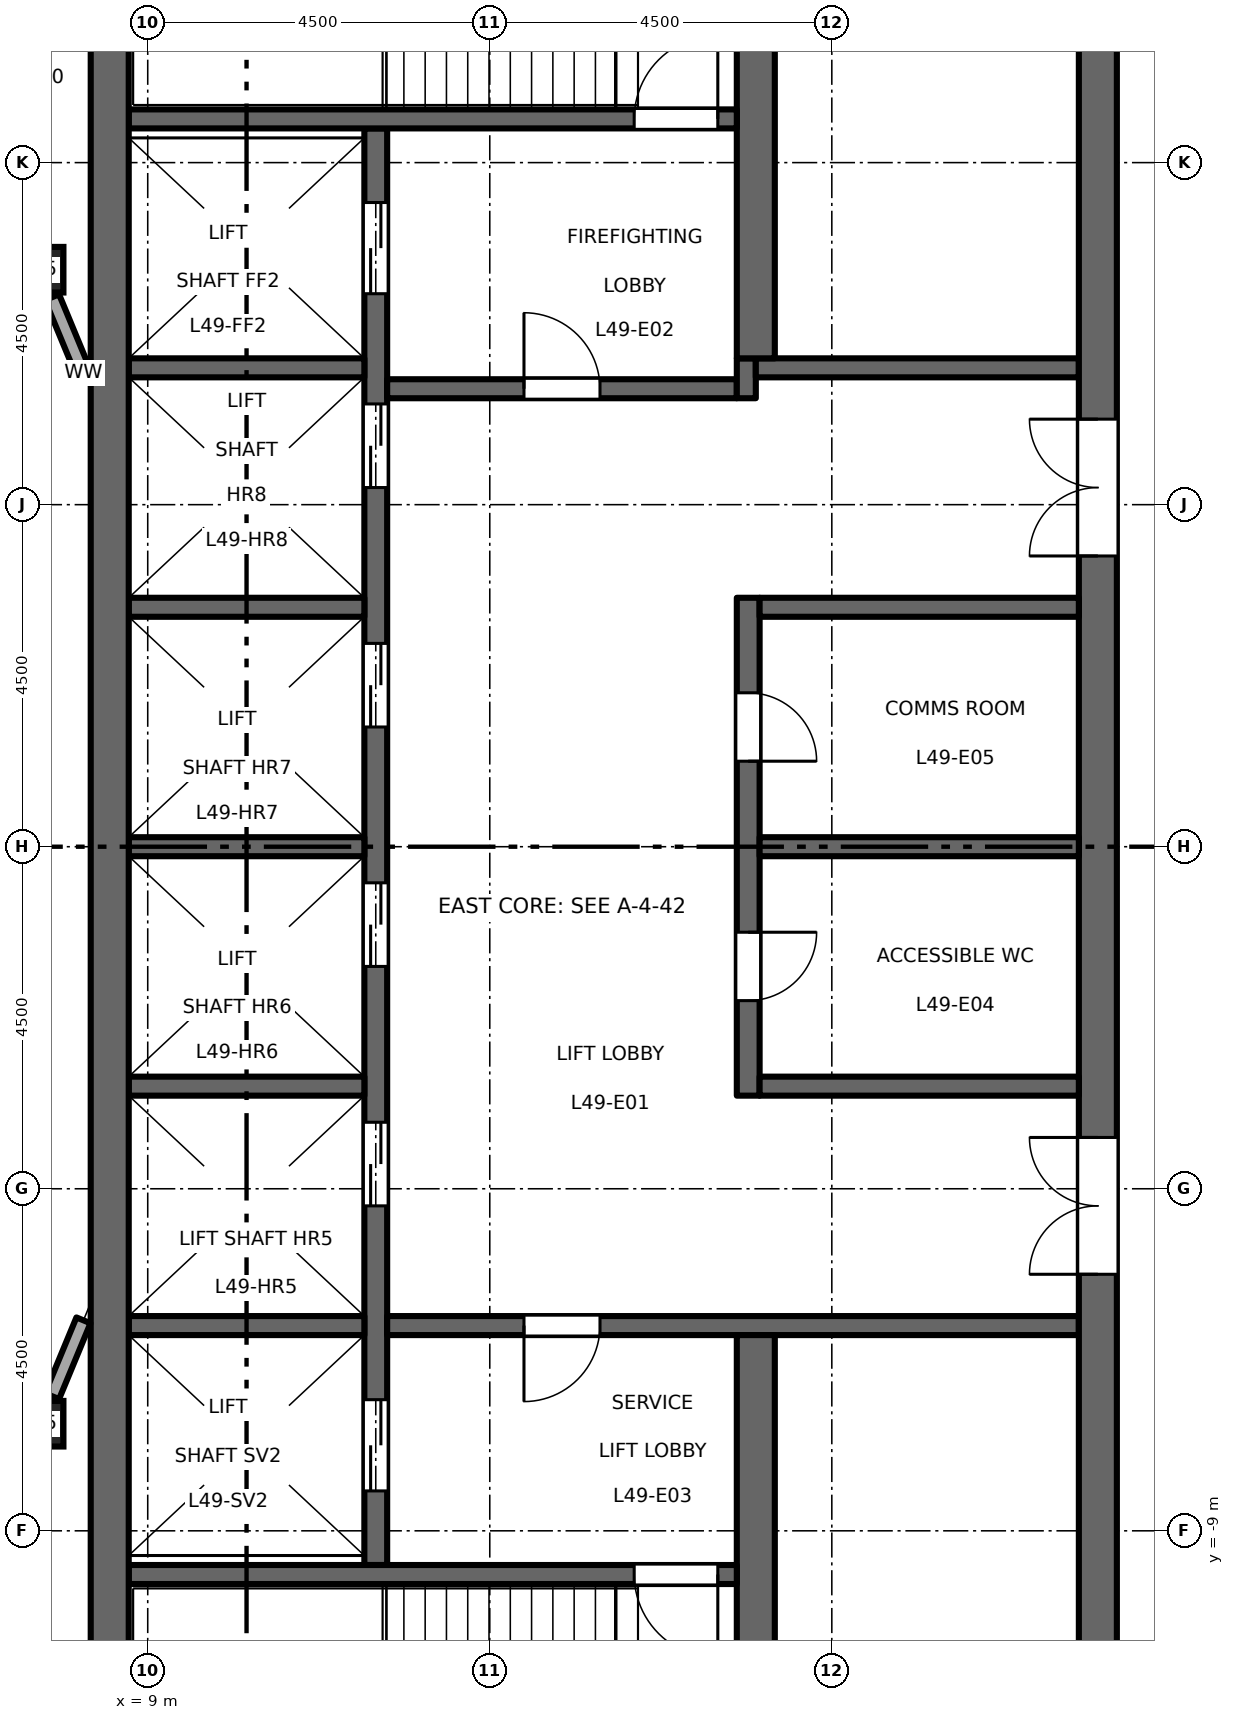
"""IFC4 building model, lengths in metres.
Left out: names, types, materials, properties, quantities, classifications, styles, units other than length and angle.
Written with IfcOpenShell. Run it as: python <this file> out.ifc"""

import sys

from ifc_helpers import new_model, si_unit, direction, frame, frame_2d, origin, origin_2d, place, context, subcontext, project, spatial, rectangle, hollow_rectangle, extrude, element, fill, save


model = new_model("IFC4")
c1 = context("Model", 3, precision=1e-05, world=origin(), true_north=direction((0.0, 1.0)))
c2 = subcontext(c1, "Body", "Model", "MODEL_VIEW")
j1 = project(units=[si_unit("LENGTHUNIT", "METRE"), si_unit("PLANEANGLEUNIT", "RADIAN")], contexts=[c1])
p1 = place(None, origin())
s1 = spatial("IfcSite", under=j1, at=p1, CompositionType="ELEMENT")
p2 = place(p1, origin())
s2 = spatial("IfcBuilding", under=s1, at=p2, CompositionType="ELEMENT")
p3 = place(p2, frame((0.0, 0.0, 228.7)))
s3 = spatial("IfcBuildingStorey", under=s2, at=p3, CompositionType="ELEMENT", Elevation=228.7)
for number, where, z_axis, x_axis in (
    (1, (7.591, -7.591, 0.0), (0.0, 0.0, 1.0), (1.0, 0.0, 0.0)),
    (2, (7.591, 7.591, 0.0), (0.0, 0.0, 1.0), (1.0, 0.0, 0.0)),
):
    element("IfcColumn", number, at=place(p3, frame(where, z_axis=z_axis, x_axis=x_axis)), inside=s3, PredefinedType="COLUMN", context=c2, shape_type="SweptSolid", body=[
        extrude(hollow_rectangle(XDim=0.6, YDim=0.6, WallThickness=0.032, at=origin_2d()), origin(), (0.0, 0.0, 1.0), 4.5),
    ])
p4 = place(p3, frame((12.0, -9.45, 0.0), z_axis=(0.0, 0.0, 1.0), x_axis=(0.0, 1.0, 0.0)))
e3 = element("IfcWall", 3, at=p4, inside=s3, PredefinedType="SHEAR", context=c2, shape_type="SweptSolid", body=[
    extrude(rectangle(XDim=18.9, YDim=0.3, at=frame_2d((9.45, 0.0))), origin(), (0.0, 0.0, 1.0), 4.35),
])
p5 = place(p4, frame((4.725, 0.0, 0.0)))
e4 = element("IfcOpeningElement", 4, at=p5, cuts=e3, PredefinedType="OPENING", context=c2, shape_type="SweptSolid", body=[
    extrude(rectangle(XDim=1.1, YDim=2.1, at=frame_2d((0.55, 1.05))), frame((0.0, 0.16, 0.0), z_axis=(0.0, -1.0, 0.0), x_axis=(1.0, 0.0, 0.0)), (0.0, 0.0, 1.0), 0.32),
])
p6 = place(p4, frame((7.875, 0.0, 0.0)))
e5 = element("IfcOpeningElement", 5, at=p6, cuts=e3, PredefinedType="OPENING", context=c2, shape_type="SweptSolid", body=[
    extrude(rectangle(XDim=1.1, YDim=2.1, at=frame_2d((0.55, 1.05))), frame((0.0, 0.16, 0.0), z_axis=(0.0, -1.0, 0.0), x_axis=(1.0, 0.0, 0.0)), (0.0, 0.0, 1.0), 0.32),
])
p7 = place(p4, frame((11.025, 0.0, 0.0)))
e6 = element("IfcOpeningElement", 6, at=p7, cuts=e3, PredefinedType="OPENING", context=c2, shape_type="SweptSolid", body=[
    extrude(rectangle(XDim=1.1, YDim=2.1, at=frame_2d((0.55, 1.05))), frame((0.0, 0.16, 0.0), z_axis=(0.0, -1.0, 0.0), x_axis=(1.0, 0.0, 0.0)), (0.0, 0.0, 1.0), 0.32),
])
p8 = place(p4, frame((14.175, 0.0, 0.0)))
e7 = element("IfcOpeningElement", 7, at=p8, cuts=e3, PredefinedType="OPENING", context=c2, shape_type="SweptSolid", body=[
    extrude(rectangle(XDim=1.1, YDim=2.1, at=frame_2d((0.55, 1.05))), frame((0.0, 0.16, 0.0), z_axis=(0.0, -1.0, 0.0), x_axis=(1.0, 0.0, 0.0)), (0.0, 0.0, 1.0), 0.32),
])
p9 = place(p4, frame((16.725, 0.0, 0.0)))
e8 = element("IfcOpeningElement", 8, at=p9, cuts=e3, PredefinedType="OPENING", context=c2, shape_type="SweptSolid", body=[
    extrude(rectangle(XDim=1.2, YDim=2.1, at=frame_2d((0.6, 1.05))), frame((0.0, 0.16, 0.0), z_axis=(0.0, -1.0, 0.0), x_axis=(1.0, 0.0, 0.0)), (0.0, 0.0, 1.0), 0.32),
])
p10 = place(p4, frame((0.975, 0.0, 0.0)))
e9 = element("IfcOpeningElement", 9, at=p10, cuts=e3, PredefinedType="OPENING", context=c2, shape_type="SweptSolid", body=[
    extrude(rectangle(XDim=1.2, YDim=2.1, at=frame_2d((0.6, 1.05))), frame((0.0, 0.16, 0.0), z_axis=(0.0, -1.0, 0.0), x_axis=(1.0, 0.0, 0.0)), (0.0, 0.0, 1.0), 0.32),
])
p11 = place(p3, frame((12.15, 6.025, 0.0), z_axis=(0.0, 0.0, 1.0), x_axis=(1.0, 0.0, 0.0)))
e10 = element("IfcWall", 10, at=p11, inside=s3, PredefinedType="SHEAR", context=c2, shape_type="SweptSolid", body=[
    extrude(rectangle(XDim=4.6, YDim=0.25, at=frame_2d((2.3, 0.0))), origin(), (0.0, 0.0, 1.0), 4.35),
])
p12 = place(p11, frame((1.8, 0.0, 0.0)))
e11 = element("IfcOpeningElement", 11, at=p12, cuts=e10, PredefinedType="OPENING", context=c2, shape_type="SweptSolid", body=[
    extrude(rectangle(XDim=1.0, YDim=2.1, at=frame_2d((0.5, 1.05))), frame((0.0, 0.135, 0.0), z_axis=(0.0, -1.0, 0.0), x_axis=(1.0, 0.0, 0.0)), (0.0, 0.0, 1.0), 0.27),
])
p13 = place(p3, frame((16.875, 5.9, 0.0), z_axis=(0.0, 0.0, 1.0), x_axis=(0.0, 1.0, 0.0)))
e12 = element("IfcWall", 12, at=p13, inside=s3, PredefinedType="SHEAR", context=c2, shape_type="SweptSolid", body=[
    extrude(rectangle(XDim=0.525, YDim=0.25, at=frame_2d((0.263, 0.0))), origin(), (0.0, 0.0, 1.0), 4.35),
])
p14 = place(p3, frame((17.0, 6.3, 0.0), z_axis=(0.0, 0.0, 1.0), x_axis=(1.0, 0.0, 0.0)))
e13 = element("IfcWall", 13, at=p14, inside=s3, PredefinedType="SHEAR", context=c2, shape_type="SweptSolid", body=[
    extrude(rectangle(XDim=4.25, YDim=0.25, at=frame_2d((2.125, 0.0))), origin(), (0.0, 0.0, 1.0), 4.35),
])
p15 = place(p3, frame((12.15, -6.3, 0.0), z_axis=(0.0, 0.0, 1.0), x_axis=(1.0, 0.0, 0.0)))
e14 = element("IfcWall", 14, at=p15, inside=s3, PredefinedType="SHEAR", context=c2, shape_type="SweptSolid", body=[
    extrude(rectangle(XDim=9.1, YDim=0.25, at=frame_2d((4.55, 0.0))), origin(), (0.0, 0.0, 1.0), 4.35),
])
p16 = place(p15, frame((1.8, 0.0, 0.0)))
e15 = element("IfcOpeningElement", 15, at=p16, cuts=e14, PredefinedType="OPENING", context=c2, shape_type="SweptSolid", body=[
    extrude(rectangle(XDim=1.0, YDim=2.1, at=frame_2d((0.5, 1.05))), frame((0.0, 0.135, 0.0), z_axis=(0.0, -1.0, 0.0), x_axis=(1.0, 0.0, 0.0)), (0.0, 0.0, 1.0), 0.27),
])
p17 = place(p3, frame((21.5, -13.0, 0.0), z_axis=(0.0, 0.0, 1.0), x_axis=(0.0, 1.0, 0.0)))
e16 = element("IfcWall", 16, at=p17, inside=s3, PredefinedType="SHEAR", context=c2, shape_type="SweptSolid", body=[
    extrude(rectangle(XDim=26.0, YDim=0.5, at=frame_2d((13.0, 0.0))), origin(), (0.0, 0.0, 1.0), 4.35),
])
p18 = place(p17, frame((16.825, 0.0, 0.0)))
e17 = element("IfcOpeningElement", 17, at=p18, cuts=e16, PredefinedType="OPENING", context=c2, shape_type="SweptSolid", body=[
    extrude(rectangle(XDim=1.8, YDim=2.1, at=frame_2d((0.9, 1.05))), frame((0.0, 0.26, 0.0), z_axis=(0.0, -1.0, 0.0), x_axis=(1.0, 0.0, 0.0)), (0.0, 0.0, 1.0), 0.52),
])
p19 = place(p17, frame((7.375, 0.0, 0.0)))
e18 = element("IfcOpeningElement", 18, at=p19, cuts=e16, PredefinedType="OPENING", context=c2, shape_type="SweptSolid", body=[
    extrude(rectangle(XDim=1.8, YDim=2.1, at=frame_2d((0.9, 1.05))), frame((0.0, 0.26, 0.0), z_axis=(0.0, -1.0, 0.0), x_axis=(1.0, 0.0, 0.0)), (0.0, 0.0, 1.0), 0.52),
])
p20 = place(p3, frame((16.9, -3.275, 0.0), z_axis=(0.0, 0.0, 1.0), x_axis=(0.0, 1.0, 0.0)))
e19 = element("IfcWall", 19, at=p20, inside=s3, PredefinedType="SHEAR", context=c2, shape_type="SweptSolid", body=[
    extrude(rectangle(XDim=6.55, YDim=0.3, at=frame_2d((3.275, 0.0))), origin(), (0.0, 0.0, 1.0), 4.35),
])
p21 = place(p20, frame((1.25, 0.0, 0.0)))
e20 = element("IfcOpeningElement", 20, at=p21, cuts=e19, PredefinedType="OPENING", context=c2, shape_type="SweptSolid", body=[
    extrude(rectangle(XDim=0.9, YDim=2.1, at=frame_2d((0.45, 1.05))), frame((0.0, 0.16, 0.0), z_axis=(0.0, -1.0, 0.0), x_axis=(1.0, 0.0, 0.0)), (0.0, 0.0, 1.0), 0.32),
])
p22 = place(p20, frame((4.4, 0.0, 0.0)))
e21 = element("IfcOpeningElement", 21, at=p22, cuts=e19, PredefinedType="OPENING", context=c2, shape_type="SweptSolid", body=[
    extrude(rectangle(XDim=0.9, YDim=2.1, at=frame_2d((0.45, 1.05))), frame((0.0, 0.16, 0.0), z_axis=(0.0, -1.0, 0.0), x_axis=(1.0, 0.0, 0.0)), (0.0, 0.0, 1.0), 0.32),
])
for number, where, z_axis, x_axis in (
    (22, (17.05, 0.0, 0.0), (0.0, 0.0, 1.0), (1.0, 0.0, 0.0)),
    (23, (17.05, 3.15, 0.0), (0.0, 0.0, 1.0), (1.0, 0.0, 0.0)),
    (24, (17.05, -3.15, 0.0), (0.0, 0.0, 1.0), (1.0, 0.0, 0.0)),
):
    element("IfcWall", number, at=place(p3, frame(where, z_axis=z_axis, x_axis=x_axis)), inside=s3, PredefinedType="SHEAR", context=c2, shape_type="SweptSolid", body=[
        extrude(rectangle(XDim=4.2, YDim=0.25, at=frame_2d((2.1, 0.0))), origin(), (0.0, 0.0, 1.0), 4.35),
    ])
for number, where, z_axis, x_axis in (
    (25, (17.0, 6.425, 0.0), (0.0, 0.0, 1.0), (0.0, 1.0, 0.0)),
    (26, (17.0, -13.0, 0.0), (0.0, 0.0, 1.0), (0.0, 1.0, 0.0)),
):
    element("IfcWall", number, at=place(p3, frame(where, z_axis=z_axis, x_axis=x_axis)), inside=s3, PredefinedType="SHEAR", context=c2, shape_type="SweptSolid", body=[
        extrude(rectangle(XDim=6.575, YDim=0.5, at=frame_2d((3.288, 0.0))), origin(), (0.0, 0.0, 1.0), 4.35),
    ])
for number, where, z_axis, x_axis in (
    (27, (8.75, 0.0, 0.0), (0.0, 0.0, 1.0), (1.0, 0.0, 0.0)),
    (28, (8.75, 3.15, 0.0), (0.0, 0.0, 1.0), (1.0, 0.0, 0.0)),
    (29, (8.75, 6.3, 0.0), (0.0, 0.0, 1.0), (1.0, 0.0, 0.0)),
    (30, (8.75, -3.15, 0.0), (0.0, 0.0, 1.0), (1.0, 0.0, 0.0)),
    (31, (8.75, -6.3, 0.0), (0.0, 0.0, 1.0), (1.0, 0.0, 0.0)),
):
    element("IfcWall", number, at=place(p3, frame(where, z_axis=z_axis, x_axis=x_axis)), inside=s3, PredefinedType="SHEAR", context=c2, shape_type="SweptSolid", body=[
        extrude(rectangle(XDim=3.1, YDim=0.25, at=frame_2d((1.55, 0.0))), origin(), (0.0, 0.0, 1.0), 4.35),
    ])
p23 = place(p3, frame((8.75, 9.575, 0.0), z_axis=(0.0, 0.0, 1.0), x_axis=(1.0, 0.0, 0.0)))
e32 = element("IfcWall", 32, at=p23, inside=s3, PredefinedType="SHEAR", context=c2, shape_type="SweptSolid", body=[
    extrude(rectangle(XDim=8.0, YDim=0.25, at=frame_2d((4.0, 0.0))), origin(), (0.0, 0.0, 1.0), 4.35),
])
p24 = place(p23, frame((6.65, 0.0, 0.0)))
e33 = element("IfcOpeningElement", 33, at=p24, cuts=e32, PredefinedType="OPENING", context=c2, shape_type="SweptSolid", body=[
    extrude(rectangle(XDim=1.1, YDim=2.1, at=frame_2d((0.55, 1.05))), frame((0.0, 0.135, 0.0), z_axis=(0.0, -1.0, 0.0), x_axis=(1.0, 0.0, 0.0)), (0.0, 0.0, 1.0), 0.27),
])
p25 = place(p3, frame((8.75, -9.575, 0.0), z_axis=(0.0, 0.0, 1.0), x_axis=(1.0, 0.0, 0.0)))
e34 = element("IfcWall", 34, at=p25, inside=s3, PredefinedType="SHEAR", context=c2, shape_type="SweptSolid", body=[
    extrude(rectangle(XDim=8.0, YDim=0.25, at=frame_2d((4.0, 0.0))), origin(), (0.0, 0.0, 1.0), 4.35),
])
p26 = place(p25, frame((6.65, 0.0, 0.0)))
e35 = element("IfcOpeningElement", 35, at=p26, cuts=e34, PredefinedType="OPENING", context=c2, shape_type="SweptSolid", body=[
    extrude(rectangle(XDim=1.1, YDim=2.1, at=frame_2d((0.55, 1.05))), frame((0.0, 0.135, 0.0), z_axis=(0.0, -1.0, 0.0), x_axis=(1.0, 0.0, 0.0)), (0.0, 0.0, 1.0), 0.27),
])
p27 = place(p3, frame((8.5, -13.0, 0.0), z_axis=(0.0, 0.0, 1.0), x_axis=(0.0, 1.0, 0.0)))
e36 = element("IfcWall", 36, at=p27, inside=s3, PredefinedType="SHEAR", context=c2, shape_type="SweptSolid", body=[
    extrude(rectangle(XDim=26.0, YDim=0.5, at=frame_2d((13.0, 0.0))), origin(), (0.0, 0.0, 1.0), 4.35),
])
for number, where, z_axis, x_axis in (
    (37, (7.741, -7.229, 0.0), (0.0, 0.0, 1.0), (0.383, 0.924, 0.0)),
    (38, (8.154, 6.231, 0.0), (0.0, 0.0, 1.0), (-0.383, 0.924, 0.0)),
):
    element("IfcWall", number, at=place(p3, frame(where, z_axis=z_axis, x_axis=x_axis)), inside=s3, PredefinedType="STANDARD", context=c2, shape_type="SweptSolid", body=[
        extrude(rectangle(XDim=1.08, YDim=0.2, at=frame_2d((0.54, 0.0))), origin(), (0.0, 0.0, 1.0), 3.918),
    ])
p28 = place(p12, origin())
e39 = element("IfcDoor", 39, at=p28, inside=s3, OperationType="SINGLE_SWING_RIGHT", PredefinedType="DOOR", context=c2, shape_type="SweptSolid", body=[
    extrude(rectangle(XDim=1.0, YDim=2.1, at=frame_2d((0.5, 1.05))), frame((0.0, 0.025, 0.0), z_axis=(0.0, -1.0, 0.0), x_axis=(1.0, 0.0, 0.0)), (0.0, 0.0, 1.0), 0.05),
])
fill(e11, e39)
p29 = place(p16, origin())
e40 = element("IfcDoor", 40, at=p29, inside=s3, OperationType="SINGLE_SWING_LEFT", PredefinedType="DOOR", context=c2, shape_type="SweptSolid", body=[
    extrude(rectangle(XDim=1.0, YDim=2.1, at=frame_2d((0.5, 1.05))), frame((0.0, 0.025, 0.0), z_axis=(0.0, -1.0, 0.0), x_axis=(1.0, 0.0, 0.0)), (0.0, 0.0, 1.0), 0.05),
])
fill(e15, e40)
p30 = place(p24, origin())
e41 = element("IfcDoor", 41, at=p30, inside=s3, OperationType="SINGLE_SWING_LEFT", PredefinedType="DOOR", context=c2, shape_type="SweptSolid", body=[
    extrude(rectangle(XDim=1.1, YDim=2.1, at=frame_2d((0.55, 1.05))), frame((0.0, 0.025, 0.0), z_axis=(0.0, -1.0, 0.0), x_axis=(1.0, 0.0, 0.0)), (0.0, 0.0, 1.0), 0.05),
])
fill(e33, e41)
p31 = place(p26, origin())
e42 = element("IfcDoor", 42, at=p31, inside=s3, OperationType="SINGLE_SWING_RIGHT", PredefinedType="DOOR", context=c2, shape_type="SweptSolid", body=[
    extrude(rectangle(XDim=1.1, YDim=2.1, at=frame_2d((0.55, 1.05))), frame((0.0, 0.025, 0.0), z_axis=(0.0, -1.0, 0.0), x_axis=(1.0, 0.0, 0.0)), (0.0, 0.0, 1.0), 0.05),
])
fill(e35, e42)
p32 = place(p18, origin())
e43 = element("IfcDoor", 43, at=p32, inside=s3, OperationType="DOUBLE_DOOR_DOUBLE_SWING", PredefinedType="DOOR", context=c2, shape_type="SweptSolid", body=[
    extrude(rectangle(XDim=1.8, YDim=2.1, at=frame_2d((0.9, 1.05))), frame((0.0, 0.025, 0.0), z_axis=(0.0, -1.0, 0.0), x_axis=(1.0, 0.0, 0.0)), (0.0, 0.0, 1.0), 0.05),
])
fill(e17, e43)
p33 = place(p19, origin())
e44 = element("IfcDoor", 44, at=p33, inside=s3, OperationType="DOUBLE_DOOR_DOUBLE_SWING", PredefinedType="DOOR", context=c2, shape_type="SweptSolid", body=[
    extrude(rectangle(XDim=1.8, YDim=2.1, at=frame_2d((0.9, 1.05))), frame((0.0, 0.025, 0.0), z_axis=(0.0, -1.0, 0.0), x_axis=(1.0, 0.0, 0.0)), (0.0, 0.0, 1.0), 0.05),
])
fill(e18, e44)
p34 = place(p5, origin())
e45 = element("IfcDoor", 45, at=p34, inside=s3, OperationType="DOUBLE_DOOR_SLIDING", PredefinedType="DOOR", context=c2, shape_type="SweptSolid", body=[
    extrude(rectangle(XDim=1.1, YDim=2.1, at=frame_2d((0.55, 1.05))), frame((0.0, 0.025, 0.0), z_axis=(0.0, -1.0, 0.0), x_axis=(1.0, 0.0, 0.0)), (0.0, 0.0, 1.0), 0.05),
])
fill(e4, e45)
p35 = place(p6, origin())
e46 = element("IfcDoor", 46, at=p35, inside=s3, OperationType="DOUBLE_DOOR_SLIDING", PredefinedType="DOOR", context=c2, shape_type="SweptSolid", body=[
    extrude(rectangle(XDim=1.1, YDim=2.1, at=frame_2d((0.55, 1.05))), frame((0.0, 0.025, 0.0), z_axis=(0.0, -1.0, 0.0), x_axis=(1.0, 0.0, 0.0)), (0.0, 0.0, 1.0), 0.05),
])
fill(e5, e46)
p36 = place(p7, origin())
e47 = element("IfcDoor", 47, at=p36, inside=s3, OperationType="DOUBLE_DOOR_SLIDING", PredefinedType="DOOR", context=c2, shape_type="SweptSolid", body=[
    extrude(rectangle(XDim=1.1, YDim=2.1, at=frame_2d((0.55, 1.05))), frame((0.0, 0.025, 0.0), z_axis=(0.0, -1.0, 0.0), x_axis=(1.0, 0.0, 0.0)), (0.0, 0.0, 1.0), 0.05),
])
fill(e6, e47)
p37 = place(p8, origin())
e48 = element("IfcDoor", 48, at=p37, inside=s3, OperationType="DOUBLE_DOOR_SLIDING", PredefinedType="DOOR", context=c2, shape_type="SweptSolid", body=[
    extrude(rectangle(XDim=1.1, YDim=2.1, at=frame_2d((0.55, 1.05))), frame((0.0, 0.025, 0.0), z_axis=(0.0, -1.0, 0.0), x_axis=(1.0, 0.0, 0.0)), (0.0, 0.0, 1.0), 0.05),
])
fill(e7, e48)
p38 = place(p9, origin())
e49 = element("IfcDoor", 49, at=p38, inside=s3, OperationType="DOUBLE_DOOR_SLIDING", PredefinedType="DOOR", context=c2, shape_type="SweptSolid", body=[
    extrude(rectangle(XDim=1.2, YDim=2.1, at=frame_2d((0.6, 1.05))), frame((0.0, 0.025, 0.0), z_axis=(0.0, -1.0, 0.0), x_axis=(1.0, 0.0, 0.0)), (0.0, 0.0, 1.0), 0.05),
])
fill(e8, e49)
p39 = place(p10, origin())
e50 = element("IfcDoor", 50, at=p39, inside=s3, OperationType="DOUBLE_DOOR_SLIDING", PredefinedType="DOOR", context=c2, shape_type="SweptSolid", body=[
    extrude(rectangle(XDim=1.2, YDim=2.1, at=frame_2d((0.6, 1.05))), frame((0.0, 0.025, 0.0), z_axis=(0.0, -1.0, 0.0), x_axis=(1.0, 0.0, 0.0)), (0.0, 0.0, 1.0), 0.05),
])
fill(e9, e50)
p40 = place(p21, origin())
e51 = element("IfcDoor", 51, at=p40, inside=s3, OperationType="SINGLE_SWING_RIGHT", PredefinedType="DOOR", context=c2, shape_type="SweptSolid", body=[
    extrude(rectangle(XDim=0.9, YDim=2.1, at=frame_2d((0.45, 1.05))), frame((0.0, 0.025, 0.0), z_axis=(0.0, -1.0, 0.0), x_axis=(1.0, 0.0, 0.0)), (0.0, 0.0, 1.0), 0.05),
])
fill(e20, e51)
p41 = place(p22, origin())
e52 = element("IfcDoor", 52, at=p41, inside=s3, OperationType="SINGLE_SWING_LEFT", PredefinedType="DOOR", context=c2, shape_type="SweptSolid", body=[
    extrude(rectangle(XDim=0.9, YDim=2.1, at=frame_2d((0.45, 1.05))), frame((0.0, 0.025, 0.0), z_axis=(0.0, -1.0, 0.0), x_axis=(1.0, 0.0, 0.0)), (0.0, 0.0, 1.0), 0.05),
])
fill(e21, e52)
save(model, sys.argv[1])
